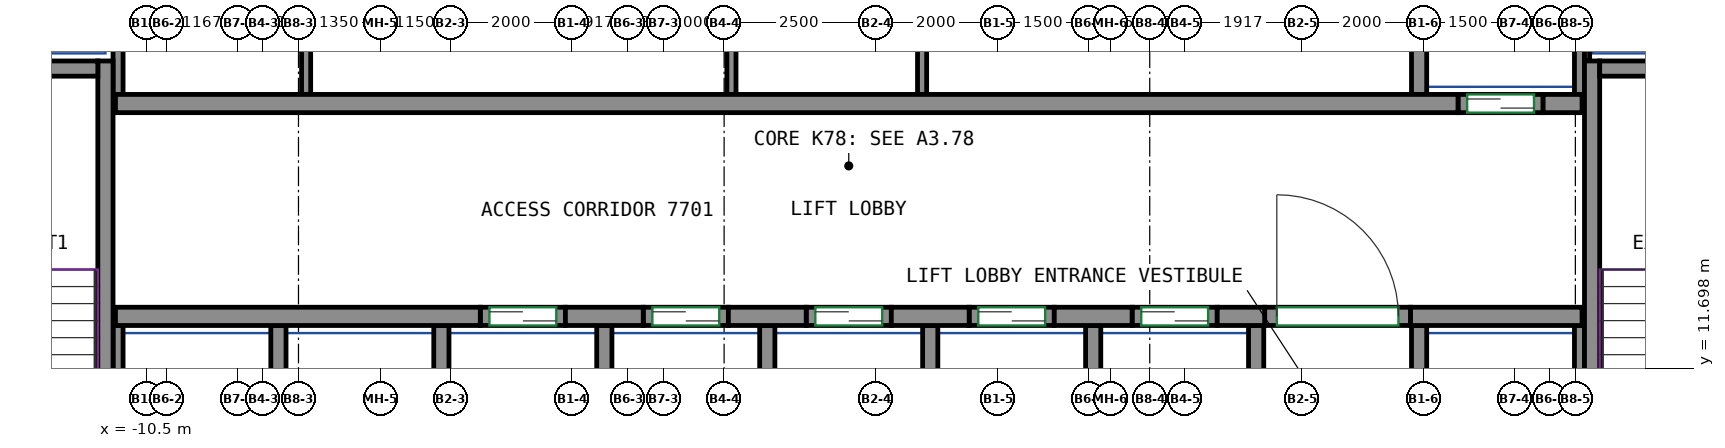
"""IFC4 building model, lengths in metres.
Left out: names, types, materials, properties, quantities, classifications, styles, units other than length and angle.
Written with IfcOpenShell. Run it as: python <this file> out.ifc"""

import sys

from ifc_helpers import new_model, si_unit, direction, frame, frame_2d, origin, place, context, subcontext, project, spatial, rectangle, extrude, source, transform, mapped, element, fill, save


model = new_model("IFC4")
c1 = context("Model", 3, precision=1e-05, world=origin(), true_north=direction((0.0, 1.0)))
c2 = subcontext(c1, "Body", "Model", "MODEL_VIEW")
j1 = project(units=[si_unit("LENGTHUNIT", "METRE"), si_unit("PLANEANGLEUNIT", "RADIAN")], contexts=[c1])
p1 = place(None, origin())
s1 = spatial("IfcSite", under=j1, at=p1, CompositionType="ELEMENT")
p2 = place(p1, origin())
s2 = spatial("IfcBuilding", under=s1, at=p2, CompositionType="ELEMENT")
p3 = place(p2, frame((0.0, 0.0, 308.6)))
s3 = spatial("IfcBuildingStorey", under=s2, at=p3, CompositionType="ELEMENT", Elevation=308.6)
m1 = source(origin(), c2, "Body", "SweptSolid", [
    extrude(rectangle(XDim=7.75, YDim=0.25, at=frame_2d((3.875, 0.0))), origin(), (0.0, 0.0, 1.0), 3.12),
])
p4 = place(p3, frame((-11.175, 9.0, 0.0), z_axis=(0.0, 0.0, 1.0), x_axis=(0.0, 1.0, 0.0)))
e1 = element("IfcWall", 1, at=p4, inside=s3, PredefinedType="SHEAR", context=c2, shape_type="MappedRepresentation", body=[
    mapped(m1, transform((0.0, 0.0, 0.0))),
])
m2 = source(origin(), c2, "Body", "SweptSolid", [
    extrude(rectangle(XDim=3.7, YDim=0.25, at=frame_2d((1.85, 0.0))), origin(), (0.0, 0.0, 1.0), 3.12),
])
p5 = place(p3, frame((-15.0, 16.625, 0.0), z_axis=(0.0, 0.0, 1.0), x_axis=(1.0, 0.0, 0.0)))
e2 = element("IfcWall", 2, at=p5, inside=s3, PredefinedType="SHEAR", context=c2, shape_type="MappedRepresentation", body=[
    mapped(m2, transform((0.0, 0.0, 0.0))),
])
p6 = place(p3, frame((13.275, 9.0, 0.0), z_axis=(0.0, 0.0, 1.0), x_axis=(0.0, 1.0, 0.0)))
e3 = element("IfcWall", 3, at=p6, inside=s3, PredefinedType="SHEAR", context=c2, shape_type="MappedRepresentation", body=[
    mapped(m1, transform((0.0, 0.0, 0.0))),
])
m3 = source(origin(), c2, "Body", "SweptSolid", [
    extrude(rectangle(XDim=3.7, YDim=0.25, at=frame_2d((1.85, 0.0))), origin(), (0.0, 0.0, 1.0), 3.12),
])
p7 = place(p3, frame((13.4, 16.625, 0.0), z_axis=(0.0, 0.0, 1.0), x_axis=(1.0, 0.0, 0.0)))
e4 = element("IfcWall", 4, at=p7, inside=s3, PredefinedType="SHEAR", context=c2, shape_type="MappedRepresentation", body=[
    mapped(m3, transform((0.0, 0.0, 0.0))),
])
m4 = source(origin(), c2, "Body", "SweptSolid", [
    extrude(rectangle(XDim=6.0, YDim=0.3, at=frame_2d((3.0, 0.0))), origin(), (0.0, 0.0, 1.0), 3.12),
])
p8 = place(p3, frame((-11.01, 12.55, 0.0), z_axis=(0.0, 0.0, 1.0), x_axis=(1.0, 0.0, 0.0)))
e5 = element("IfcWall", 5, at=p8, inside=s3, PredefinedType="SHEAR", context=c2, shape_type="MappedRepresentation", body=[
    mapped(m4, transform((0.0, 0.0, 0.0))),
])
m5 = source(origin(), c2, "Body", "SweptSolid", [
    extrude(rectangle(XDim=1.28, YDim=0.3, at=frame_2d((0.64, 0.0))), origin(), (0.0, 0.0, 1.0), 3.12),
])
for number, where, z_axis, x_axis in (
    (6, (-3.61, 12.55, 0.0), (0.0, 0.0, 1.0), (1.0, 0.0, 0.0)),
    (7, (-0.93, 12.55, 0.0), (0.0, 0.0, 1.0), (1.0, 0.0, 0.0)),
    (8, (1.75, 12.55, 0.0), (0.0, 0.0, 1.0), (1.0, 0.0, 0.0)),
    (9, (4.43, 12.55, 0.0), (0.0, 0.0, 1.0), (1.0, 0.0, 0.0)),
):
    element("IfcWall", number, at=place(p3, frame(where, z_axis=z_axis, x_axis=x_axis)), inside=s3, PredefinedType="SHEAR", context=c2, shape_type="MappedRepresentation", body=[
        mapped(m5, transform((0.0, 0.0, 0.0))),
    ])
m6 = source(origin(), c2, "Body", "SweptSolid", [
    extrude(rectangle(XDim=0.78, YDim=0.3, at=frame_2d((0.39, 0.0))), origin(), (0.0, 0.0, 1.0), 3.12),
])
p9 = place(p3, frame((7.11, 12.55, 0.0), z_axis=(0.0, 0.0, 1.0), x_axis=(1.0, 0.0, 0.0)))
e10 = element("IfcWall", 10, at=p9, inside=s3, PredefinedType="SHEAR", context=c2, shape_type="MappedRepresentation", body=[
    mapped(m6, transform((0.0, 0.0, 0.0))),
])
m7 = source(origin(), c2, "Body", "SweptSolid", [
    extrude(rectangle(XDim=2.82, YDim=0.3, at=frame_2d((1.41, 0.0))), origin(), (0.0, 0.0, 1.0), 3.12),
])
p10 = place(p3, frame((10.29, 12.55, 0.0), z_axis=(0.0, 0.0, 1.0), x_axis=(1.0, 0.0, 0.0)))
e11 = element("IfcWall", 11, at=p10, inside=s3, PredefinedType="SHEAR", context=c2, shape_type="MappedRepresentation", body=[
    mapped(m7, transform((0.0, 0.0, 0.0))),
])
m8 = source(origin(), c2, "Body", "SweptSolid", [
    extrude(rectangle(XDim=22.08, YDim=0.3, at=frame_2d((11.04, 0.0))), origin(), (0.0, 0.0, 1.0), 3.12),
])
p11 = place(p3, frame((-11.01, 16.05, 0.0), z_axis=(0.0, 0.0, 1.0), x_axis=(1.0, 0.0, 0.0)))
e12 = element("IfcWall", 12, at=p11, inside=s3, PredefinedType="SHEAR", context=c2, shape_type="MappedRepresentation", body=[
    mapped(m8, transform((0.0, 0.0, 0.0))),
])
m9 = source(origin(), c2, "Body", "SweptSolid", [
    extrude(rectangle(XDim=0.64, YDim=0.3, at=frame_2d((0.32, 0.0))), origin(), (0.0, 0.0, 1.0), 3.12),
])
p12 = place(p3, frame((12.47, 16.05, 0.0), z_axis=(0.0, 0.0, 1.0), x_axis=(1.0, 0.0, 0.0)))
e13 = element("IfcWall", 13, at=p12, inside=s3, PredefinedType="SHEAR", context=c2, shape_type="MappedRepresentation", body=[
    mapped(m9, transform((0.0, 0.0, 0.0))),
])
m10 = source(origin(), c2, "Body", "SweptSolid", [
    extrude(rectangle(XDim=1.4, YDim=0.3, at=frame_2d((0.7, 0.0))), origin(), (0.0, 0.0, 1.0), 3.12),
])
p13 = place(p3, frame((-5.01, 12.55, 0.0), z_axis=(0.0, 0.0, 1.0), x_axis=(1.0, 0.0, 0.0)))
e14 = element("IfcWall", 14, at=p13, inside=s3, PredefinedType="PARTITIONING", context=c2, shape_type="MappedRepresentation", body=[
    mapped(m10, transform((0.0, 0.0, 0.0))),
])
p14 = place(p13, frame((0.15, 0.0, 0.0)))
e15 = element("IfcOpeningElement", 15, at=p14, cuts=e14, PredefinedType="OPENING", context=c2, shape_type="SweptSolid", body=[
    extrude(rectangle(XDim=1.1, YDim=2.1, at=frame_2d((0.55, 1.05))), frame((0.0, 0.16, 0.0), z_axis=(0.0, -1.0, 0.0), x_axis=(1.0, 0.0, 0.0)), (0.0, 0.0, 1.0), 0.32),
])
m11 = source(origin(), c2, "Body", "SweptSolid", [
    extrude(rectangle(XDim=1.4, YDim=0.3, at=frame_2d((0.7, 0.0))), origin(), (0.0, 0.0, 1.0), 3.12),
])
p15 = place(p3, frame((-2.33, 12.55, 0.0), z_axis=(0.0, 0.0, 1.0), x_axis=(1.0, 0.0, 0.0)))
e16 = element("IfcWall", 16, at=p15, inside=s3, PredefinedType="PARTITIONING", context=c2, shape_type="MappedRepresentation", body=[
    mapped(m11, transform((0.0, 0.0, 0.0))),
])
p16 = place(p15, frame((0.15, 0.0, 0.0)))
e17 = element("IfcOpeningElement", 17, at=p16, cuts=e16, PredefinedType="OPENING", context=c2, shape_type="SweptSolid", body=[
    extrude(rectangle(XDim=1.1, YDim=2.1, at=frame_2d((0.55, 1.05))), frame((0.0, 0.16, 0.0), z_axis=(0.0, -1.0, 0.0), x_axis=(1.0, 0.0, 0.0)), (0.0, 0.0, 1.0), 0.32),
])
p17 = place(p3, frame((0.35, 12.55, 0.0), z_axis=(0.0, 0.0, 1.0), x_axis=(1.0, 0.0, 0.0)))
e18 = element("IfcWall", 18, at=p17, inside=s3, PredefinedType="PARTITIONING", context=c2, shape_type="MappedRepresentation", body=[
    mapped(m10, transform((0.0, 0.0, 0.0))),
])
p18 = place(p17, frame((0.15, 0.0, 0.0)))
e19 = element("IfcOpeningElement", 19, at=p18, cuts=e18, PredefinedType="OPENING", context=c2, shape_type="SweptSolid", body=[
    extrude(rectangle(XDim=1.1, YDim=2.1, at=frame_2d((0.55, 1.05))), frame((0.0, 0.16, 0.0), z_axis=(0.0, -1.0, 0.0), x_axis=(1.0, 0.0, 0.0)), (0.0, 0.0, 1.0), 0.32),
])
p19 = place(p3, frame((3.03, 12.55, 0.0), z_axis=(0.0, 0.0, 1.0), x_axis=(1.0, 0.0, 0.0)))
e20 = element("IfcWall", 20, at=p19, inside=s3, PredefinedType="PARTITIONING", context=c2, shape_type="MappedRepresentation", body=[
    mapped(m10, transform((0.0, 0.0, 0.0))),
])
p20 = place(p19, frame((0.15, 0.0, 0.0)))
e21 = element("IfcOpeningElement", 21, at=p20, cuts=e20, PredefinedType="OPENING", context=c2, shape_type="SweptSolid", body=[
    extrude(rectangle(XDim=1.1, YDim=2.1, at=frame_2d((0.55, 1.05))), frame((0.0, 0.16, 0.0), z_axis=(0.0, -1.0, 0.0), x_axis=(1.0, 0.0, 0.0)), (0.0, 0.0, 1.0), 0.32),
])
p21 = place(p3, frame((5.71, 12.55, 0.0), z_axis=(0.0, 0.0, 1.0), x_axis=(1.0, 0.0, 0.0)))
e22 = element("IfcWall", 22, at=p21, inside=s3, PredefinedType="PARTITIONING", context=c2, shape_type="MappedRepresentation", body=[
    mapped(m11, transform((0.0, 0.0, 0.0))),
])
p22 = place(p21, frame((0.15, 0.0, 0.0)))
e23 = element("IfcOpeningElement", 23, at=p22, cuts=e22, PredefinedType="OPENING", context=c2, shape_type="SweptSolid", body=[
    extrude(rectangle(XDim=1.1, YDim=2.1, at=frame_2d((0.55, 1.05))), frame((0.0, 0.16, 0.0), z_axis=(0.0, -1.0, 0.0), x_axis=(1.0, 0.0, 0.0)), (0.0, 0.0, 1.0), 0.32),
])
p23 = place(p3, frame((11.07, 16.05, 0.0), z_axis=(0.0, 0.0, 1.0), x_axis=(1.0, 0.0, 0.0)))
e24 = element("IfcWall", 24, at=p23, inside=s3, PredefinedType="PARTITIONING", context=c2, shape_type="MappedRepresentation", body=[
    mapped(m10, transform((0.0, 0.0, 0.0))),
])
p24 = place(p23, frame((0.15, 0.0, 0.0)))
e25 = element("IfcOpeningElement", 25, at=p24, cuts=e24, PredefinedType="OPENING", context=c2, shape_type="SweptSolid", body=[
    extrude(rectangle(XDim=1.1, YDim=2.1, at=frame_2d((0.55, 1.05))), frame((0.0, 0.16, 0.0), z_axis=(0.0, -1.0, 0.0), x_axis=(1.0, 0.0, 0.0)), (0.0, 0.0, 1.0), 0.32),
])
m12 = source(origin(), c2, "Body", "SweptSolid", [
    extrude(rectangle(XDim=2.4, YDim=0.3, at=frame_2d((1.2, 0.0))), origin(), (0.0, 0.0, 1.0), 3.12),
])
p25 = place(p3, frame((7.89, 12.55, 0.0), z_axis=(0.0, 0.0, 1.0), x_axis=(1.0, 0.0, 0.0)))
e26 = element("IfcWall", 26, at=p25, inside=s3, PredefinedType="PARTITIONING", context=c2, shape_type="MappedRepresentation", body=[
    mapped(m12, transform((0.0, 0.0, 0.0))),
])
p26 = place(p25, frame((0.2, 0.0, 0.0)))
e27 = element("IfcOpeningElement", 27, at=p26, cuts=e26, PredefinedType="OPENING", context=c2, shape_type="SweptSolid", body=[
    extrude(rectangle(XDim=2.0, YDim=2.1, at=frame_2d((1.0, 1.05))), frame((0.0, 0.16, 0.0), z_axis=(0.0, -1.0, 0.0), x_axis=(1.0, 0.0, 0.0)), (0.0, 0.0, 1.0), 0.32),
])
m13 = source(origin(), c2, "Body", "SweptSolid", [
    extrude(rectangle(XDim=3.275, YDim=0.165, at=frame_2d((1.638, 0.0))), origin(), (0.0, 0.0, 1.0), 3.12),
])
p27 = place(p3, frame((13.067, 16.2, 0.0), z_axis=(0.0, 0.0, 1.0), x_axis=(0.0, 1.0, 0.0)))
e28 = element("IfcWall", 28, at=p27, inside=s3, PredefinedType="PARTITIONING", context=c2, shape_type="MappedRepresentation", body=[
    mapped(m13, transform((0.0, 0.0, 0.0))),
])
m14 = source(origin(), c2, "Body", "SweptSolid", [
    extrude(rectangle(XDim=4.8, YDim=0.165, at=frame_2d((2.4, 0.0))), origin(), (0.0, 0.0, 1.0), 3.12),
])
p28 = place(p3, frame((-10.968, 16.2, 0.0), z_axis=(0.0, 0.0, 1.0), x_axis=(0.0, 1.0, 0.0)))
e29 = element("IfcWall", 29, at=p28, inside=s3, PredefinedType="PARTITIONING", context=c2, shape_type="MappedRepresentation", body=[
    mapped(m14, transform((0.0, 0.0, 0.0))),
])
m15 = source(origin(), c2, "Body", "SweptSolid", [
    extrude(rectangle(XDim=3.275, YDim=0.25, at=frame_2d((1.638, 0.0))), origin(), (0.0, 0.0, 1.0), 3.12),
])
p29 = place(p3, frame((10.43, 16.2, 0.0), z_axis=(0.0, 0.0, 1.0), x_axis=(0.0, 1.0, 0.0)))
e30 = element("IfcWall", 30, at=p29, inside=s3, PredefinedType="PARTITIONING", context=c2, shape_type="MappedRepresentation", body=[
    mapped(m15, transform((0.0, 0.0, 0.0))),
])
m16 = source(origin(), c2, "Body", "SweptSolid", [
    extrude(rectangle(XDim=2.725, YDim=0.085, at=frame_2d((1.363, 0.0))), origin(), (0.0, 0.0, 1.0), 3.12),
])
p30 = place(p3, frame((13.192, 16.75, 0.0), z_axis=(0.0, 0.0, 1.0), x_axis=(0.0, 1.0, 0.0)))
e31 = element("IfcWall", 31, at=p30, inside=s3, PredefinedType="PARTITIONING", context=c2, shape_type="MappedRepresentation", body=[
    mapped(m16, transform((0.0, 0.0, 0.0))),
])
m17 = source(origin(), c2, "Body", "SweptSolid", [
    extrude(rectangle(XDim=3.4, YDim=0.25, at=frame_2d((1.7, 0.0))), origin(), (0.0, 0.0, 1.0), 3.12),
])
p31 = place(p3, frame((10.43, 9.0, 0.0), z_axis=(0.0, 0.0, 1.0), x_axis=(0.0, 1.0, 0.0)))
e32 = element("IfcWall", 32, at=p31, inside=s3, PredefinedType="PARTITIONING", context=c2, shape_type="MappedRepresentation", body=[
    mapped(m17, transform((0.0, 0.0, 0.0))),
])
m18 = source(origin(), c2, "Body", "SweptSolid", [
    extrude(rectangle(XDim=3.4, YDim=0.165, at=frame_2d((1.7, 0.0))), origin(), (0.0, 0.0, 1.0), 3.12),
])
p32 = place(p3, frame((13.067, 9.0, 0.0), z_axis=(0.0, 0.0, 1.0), x_axis=(0.0, 1.0, 0.0)))
e33 = element("IfcWall", 33, at=p32, inside=s3, PredefinedType="PARTITIONING", context=c2, shape_type="MappedRepresentation", body=[
    mapped(m18, transform((0.0, 0.0, 0.0))),
])
for number, where, z_axis, x_axis in (
    (34, (2.39, 9.0, 0.0), (0.0, 0.0, 1.0), (0.0, 1.0, 0.0)),
    (35, (5.07, 9.0, 0.0), (0.0, 0.0, 1.0), (0.0, 1.0, 0.0)),
    (36, (7.75, 9.0, 0.0), (0.0, 0.0, 1.0), (0.0, 1.0, 0.0)),
    (37, (-0.29, 9.0, 0.0), (0.0, 0.0, 1.0), (0.0, 1.0, 0.0)),
):
    element("IfcWall", number, at=place(p3, frame(where, z_axis=z_axis, x_axis=x_axis)), inside=s3, PredefinedType="PARTITIONING", context=c2, shape_type="MappedRepresentation", body=[
        mapped(m17, transform((0.0, 0.0, 0.0))),
    ])
p33 = place(p3, frame((-10.968, 9.0, 0.0), z_axis=(0.0, 0.0, 1.0), x_axis=(0.0, 1.0, 0.0)))
e38 = element("IfcWall", 38, at=p33, inside=s3, PredefinedType="PARTITIONING", context=c2, shape_type="MappedRepresentation", body=[
    mapped(m18, transform((0.0, 0.0, 0.0))),
])
for number, where, z_axis, x_axis in (
    (39, (-2.97, 9.0, 0.0), (0.0, 0.0, 1.0), (0.0, 1.0, 0.0)),
    (40, (-5.65, 9.0, 0.0), (0.0, 0.0, 1.0), (0.0, 1.0, 0.0)),
    (41, (-8.33, 9.0, 0.0), (0.0, 0.0, 1.0), (0.0, 1.0, 0.0)),
):
    element("IfcWall", number, at=place(p3, frame(where, z_axis=z_axis, x_axis=x_axis)), inside=s3, PredefinedType="PARTITIONING", context=c2, shape_type="MappedRepresentation", body=[
        mapped(m17, transform((0.0, 0.0, 0.0))),
    ])
m19 = source(origin(), c2, "Body", "SweptSolid", [
    extrude(rectangle(XDim=4.8, YDim=0.15, at=frame_2d((2.4, 0.0))), origin(), (0.0, 0.0, 1.0), 3.12),
])
for number, where, z_axis, x_axis in (
    (42, (-7.875, 16.2, 0.0), (0.0, 0.0, 1.0), (0.0, 1.0, 0.0)),
    (43, (-0.88, 16.2, 0.0), (0.0, 0.0, 1.0), (0.0, 1.0, 0.0)),
    (44, (2.256, 16.2, 0.0), (0.0, 0.0, 1.0), (0.0, 1.0, 0.0)),
):
    element("IfcWall", number, at=place(p3, frame(where, z_axis=z_axis, x_axis=x_axis)), inside=s3, PredefinedType="PARTITIONING", context=c2, shape_type="MappedRepresentation", body=[
        mapped(m19, transform((0.0, 0.0, 0.0))),
    ])
p34 = place(p26, origin())
e45 = element("IfcDoor", 45, at=p34, inside=s3, OperationType="DOUBLE_DOOR_SINGLE_SWING", PredefinedType="DOOR", context=c2, shape_type="SweptSolid", body=[
    extrude(rectangle(XDim=2.0, YDim=2.1, at=frame_2d((1.0, 1.05))), frame((0.0, 0.025, 0.0), z_axis=(0.0, -1.0, 0.0), x_axis=(1.0, 0.0, 0.0)), (0.0, 0.0, 1.0), 0.05),
])
fill(e27, e45)
p35 = place(p14, origin())
e46 = element("IfcDoor", 46, at=p35, inside=s3, OperationType="DOUBLE_DOOR_SLIDING", PredefinedType="DOOR", context=c2, shape_type="SweptSolid", body=[
    extrude(rectangle(XDim=1.1, YDim=2.1, at=frame_2d((0.55, 1.05))), frame((0.0, 0.025, 0.0), z_axis=(0.0, -1.0, 0.0), x_axis=(1.0, 0.0, 0.0)), (0.0, 0.0, 1.0), 0.05),
])
fill(e15, e46)
p36 = place(p16, origin())
e47 = element("IfcDoor", 47, at=p36, inside=s3, OperationType="DOUBLE_DOOR_SLIDING", PredefinedType="DOOR", context=c2, shape_type="SweptSolid", body=[
    extrude(rectangle(XDim=1.1, YDim=2.1, at=frame_2d((0.55, 1.05))), frame((0.0, 0.025, 0.0), z_axis=(0.0, -1.0, 0.0), x_axis=(1.0, 0.0, 0.0)), (0.0, 0.0, 1.0), 0.05),
])
fill(e17, e47)
p37 = place(p18, origin())
e48 = element("IfcDoor", 48, at=p37, inside=s3, OperationType="DOUBLE_DOOR_SLIDING", PredefinedType="DOOR", context=c2, shape_type="SweptSolid", body=[
    extrude(rectangle(XDim=1.1, YDim=2.1, at=frame_2d((0.55, 1.05))), frame((0.0, 0.025, 0.0), z_axis=(0.0, -1.0, 0.0), x_axis=(1.0, 0.0, 0.0)), (0.0, 0.0, 1.0), 0.05),
])
fill(e19, e48)
p38 = place(p20, origin())
e49 = element("IfcDoor", 49, at=p38, inside=s3, OperationType="DOUBLE_DOOR_SLIDING", PredefinedType="DOOR", context=c2, shape_type="SweptSolid", body=[
    extrude(rectangle(XDim=1.1, YDim=2.1, at=frame_2d((0.55, 1.05))), frame((0.0, 0.025, 0.0), z_axis=(0.0, -1.0, 0.0), x_axis=(1.0, 0.0, 0.0)), (0.0, 0.0, 1.0), 0.05),
])
fill(e21, e49)
p39 = place(p22, origin())
e50 = element("IfcDoor", 50, at=p39, inside=s3, OperationType="DOUBLE_DOOR_SLIDING", PredefinedType="DOOR", context=c2, shape_type="SweptSolid", body=[
    extrude(rectangle(XDim=1.1, YDim=2.1, at=frame_2d((0.55, 1.05))), frame((0.0, 0.025, 0.0), z_axis=(0.0, -1.0, 0.0), x_axis=(1.0, 0.0, 0.0)), (0.0, 0.0, 1.0), 0.05),
])
fill(e23, e50)
p40 = place(p24, origin())
e51 = element("IfcDoor", 51, at=p40, inside=s3, OperationType="DOUBLE_DOOR_SLIDING", PredefinedType="DOOR", context=c2, shape_type="SweptSolid", body=[
    extrude(rectangle(XDim=1.1, YDim=2.1, at=frame_2d((0.55, 1.05))), frame((0.0, 0.025, 0.0), z_axis=(0.0, -1.0, 0.0), x_axis=(1.0, 0.0, 0.0)), (0.0, 0.0, 1.0), 0.05),
])
fill(e25, e51)
save(model, sys.argv[1])
